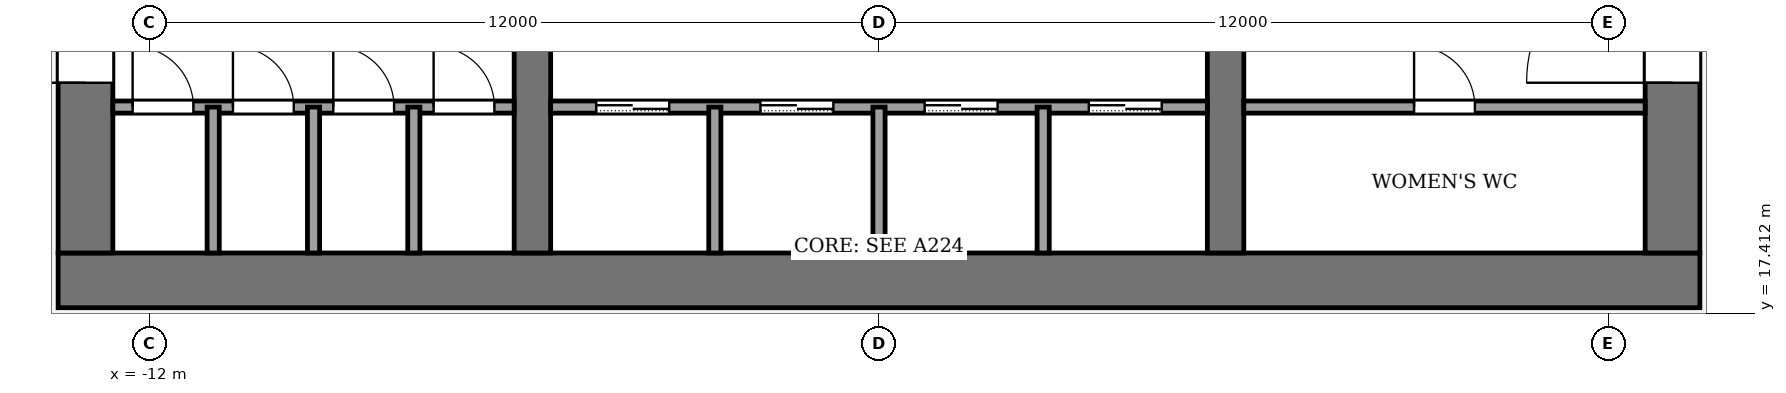
"""IFC4 building model, lengths in metres.
Left out: names, types, materials, properties, quantities, classifications, styles, units other than length and angle.
Written with IfcOpenShell. Run it as: python <this file> out.ifc"""

import sys

from ifc_helpers import new_model, si_unit, direction, frame, frame_2d, origin, place, context, subcontext, project, spatial, rectangle, extrude, element, fill, save


model = new_model("IFC4")
c1 = context("Model", 3, precision=1e-05, world=origin(), true_north=direction((0.0, 1.0)))
c2 = subcontext(c1, "Body", "Model", "MODEL_VIEW")
j1 = project(units=[si_unit("LENGTHUNIT", "METRE"), si_unit("PLANEANGLEUNIT", "RADIAN")], contexts=[c1])
p1 = place(None, origin())
s1 = spatial("IfcSite", under=j1, at=p1, CompositionType="ELEMENT")
p2 = place(p1, origin())
s2 = spatial("IfcBuilding", under=s1, at=p2, CompositionType="ELEMENT")
p3 = place(p2, frame((0.0, 0.0, 218.0)))
s3 = spatial("IfcBuildingStorey", under=s2, at=p3, CompositionType="ELEMENT", Elevation=218.0)
p4 = place(p3, frame((-13.5, 17.95, -0.13), z_axis=(0.0, 0.0, 1.0), x_axis=(1.0, 0.0, 0.0)))
e1 = element("IfcWall", 1, at=p4, inside=s3, PredefinedType="SHEAR", context=c2, shape_type="SweptSolid", body=[
    extrude(rectangle(XDim=27.0, YDim=0.9, at=frame_2d((13.5, 0.0))), origin(), (0.0, 0.0, 1.0), 4.0),
])
p5 = place(p3, frame((-13.05, 18.4, -0.13), z_axis=(0.0, 0.0, 1.0), x_axis=(0.0, 1.0, 0.0)))
e2 = element("IfcWall", 2, at=p5, inside=s3, PredefinedType="SHEAR", context=c2, shape_type="SweptSolid", body=[
    extrude(rectangle(XDim=19.2, YDim=0.9, at=frame_2d((9.6, 0.0))), origin(), (0.0, 0.0, 1.0), 4.0),
])
p6 = place(p5, frame((2.8, 0.0, 0.13)))
e3 = element("IfcOpeningElement", 3, at=p6, cuts=e2, PredefinedType="OPENING", context=c2, shape_type="SweptSolid", body=[
    extrude(rectangle(XDim=2.4, YDim=2.4, at=frame_2d((1.2, 1.2))), frame((0.0, 0.46, 0.0), z_axis=(0.0, -1.0, 0.0), x_axis=(1.0, 0.0, 0.0)), (0.0, 0.0, 1.0), 0.92),
])
p7 = place(p5, frame((13.4, 0.0, 0.13)))
e4 = element("IfcOpeningElement", 4, at=p7, cuts=e2, PredefinedType="OPENING", context=c2, shape_type="SweptSolid", body=[
    extrude(rectangle(XDim=1.4, YDim=2.2, at=frame_2d((0.7, 1.1))), frame((0.0, 0.46, 0.0), z_axis=(0.0, -1.0, 0.0), x_axis=(1.0, 0.0, 0.0)), (0.0, 0.0, 1.0), 0.92),
])
p8 = place(p3, frame((13.05, 18.4, -0.13), z_axis=(0.0, 0.0, 1.0), x_axis=(0.0, 1.0, 0.0)))
e5 = element("IfcWall", 5, at=p8, inside=s3, PredefinedType="SHEAR", context=c2, shape_type="SweptSolid", body=[
    extrude(rectangle(XDim=19.2, YDim=0.9, at=frame_2d((9.6, 0.0))), origin(), (0.0, 0.0, 1.0), 4.0),
])
p9 = place(p8, frame((2.8, 0.0, 0.13)))
e6 = element("IfcOpeningElement", 6, at=p9, cuts=e5, PredefinedType="OPENING", context=c2, shape_type="SweptSolid", body=[
    extrude(rectangle(XDim=2.4, YDim=2.4, at=frame_2d((1.2, 1.2))), frame((0.0, 0.46, 0.0), z_axis=(0.0, -1.0, 0.0), x_axis=(1.0, 0.0, 0.0)), (0.0, 0.0, 1.0), 0.92),
])
p10 = place(p8, frame((13.3, 0.0, 0.13)))
e7 = element("IfcOpeningElement", 7, at=p10, cuts=e5, PredefinedType="OPENING", context=c2, shape_type="SweptSolid", body=[
    extrude(rectangle(XDim=2.4, YDim=2.4, at=frame_2d((1.2, 1.2))), frame((0.0, 0.46, 0.0), z_axis=(0.0, -1.0, 0.0), x_axis=(1.0, 0.0, 0.0)), (0.0, 0.0, 1.0), 0.92),
])
p11 = place(p3, frame((-5.7, 18.4, -0.13), z_axis=(0.0, 0.0, 1.0), x_axis=(0.0, 1.0, 0.0)))
e8 = element("IfcWall", 8, at=p11, inside=s3, PredefinedType="SHEAR", context=c2, shape_type="SweptSolid", body=[
    extrude(rectangle(XDim=19.2, YDim=0.6, at=frame_2d((9.6, 0.0))), origin(), (0.0, 0.0, 1.0), 4.0),
])
p12 = place(p11, frame((8.35, 0.0, 0.13)))
e9 = element("IfcOpeningElement", 9, at=p12, cuts=e8, PredefinedType="OPENING", context=c2, shape_type="SweptSolid", body=[
    extrude(rectangle(XDim=0.9, YDim=2.1, at=frame_2d((0.45, 1.05))), frame((0.0, 0.31, 0.0), z_axis=(0.0, -1.0, 0.0), x_axis=(1.0, 0.0, 0.0)), (0.0, 0.0, 1.0), 0.62),
])
p13 = place(p3, frame((5.7, 18.4, -0.13), z_axis=(0.0, 0.0, 1.0), x_axis=(0.0, 1.0, 0.0)))
e10 = element("IfcWall", 10, at=p13, inside=s3, PredefinedType="SHEAR", context=c2, shape_type="SweptSolid", body=[
    extrude(rectangle(XDim=19.2, YDim=0.6, at=frame_2d((9.6, 0.0))), origin(), (0.0, 0.0, 1.0), 4.0),
])
p14 = place(p13, frame((8.35, 0.0, 0.13)))
e11 = element("IfcOpeningElement", 11, at=p14, cuts=e10, PredefinedType="OPENING", context=c2, shape_type="SweptSolid", body=[
    extrude(rectangle(XDim=0.9, YDim=2.1, at=frame_2d((0.45, 1.05))), frame((0.0, 0.31, 0.0), z_axis=(0.0, -1.0, 0.0), x_axis=(1.0, 0.0, 0.0)), (0.0, 0.0, 1.0), 0.62),
])
p15 = place(p13, frame((13.3, 0.0, 0.13)))
e12 = element("IfcOpeningElement", 12, at=p15, cuts=e10, PredefinedType="OPENING", context=c2, shape_type="SweptSolid", body=[
    extrude(rectangle(XDim=2.4, YDim=2.4, at=frame_2d((1.2, 1.2))), frame((0.0, 0.31, 0.0), z_axis=(0.0, -1.0, 0.0), x_axis=(1.0, 0.0, 0.0)), (0.0, 0.0, 1.0), 0.62),
])
p16 = place(p3, frame((-12.6, 20.8, 0.0), z_axis=(0.0, 0.0, 1.0), x_axis=(1.0, 0.0, 0.0)))
e13 = element("IfcWall", 13, at=p16, inside=s3, PredefinedType="PARTITIONING", context=c2, shape_type="SweptSolid", body=[
    extrude(rectangle(XDim=6.6, YDim=0.2, at=frame_2d((3.3, 0.0))), origin(), (0.0, 0.0, 1.0), 3.87),
])
p17 = place(p16, frame((0.325, 0.0, 0.0)))
e14 = element("IfcOpeningElement", 14, at=p17, cuts=e13, PredefinedType="OPENING", context=c2, shape_type="SweptSolid", body=[
    extrude(rectangle(XDim=1.0, YDim=2.1, at=frame_2d((0.5, 1.05))), frame((0.0, 0.11, 0.0), z_axis=(0.0, -1.0, 0.0), x_axis=(1.0, 0.0, 0.0)), (0.0, 0.0, 1.0), 0.22),
])
p18 = place(p16, frame((1.975, 0.0, 0.0)))
e15 = element("IfcOpeningElement", 15, at=p18, cuts=e13, PredefinedType="OPENING", context=c2, shape_type="SweptSolid", body=[
    extrude(rectangle(XDim=1.0, YDim=2.1, at=frame_2d((0.5, 1.05))), frame((0.0, 0.11, 0.0), z_axis=(0.0, -1.0, 0.0), x_axis=(1.0, 0.0, 0.0)), (0.0, 0.0, 1.0), 0.22),
])
p19 = place(p16, frame((3.625, 0.0, 0.0)))
e16 = element("IfcOpeningElement", 16, at=p19, cuts=e13, PredefinedType="OPENING", context=c2, shape_type="SweptSolid", body=[
    extrude(rectangle(XDim=1.0, YDim=2.1, at=frame_2d((0.5, 1.05))), frame((0.0, 0.11, 0.0), z_axis=(0.0, -1.0, 0.0), x_axis=(1.0, 0.0, 0.0)), (0.0, 0.0, 1.0), 0.22),
])
p20 = place(p16, frame((5.275, 0.0, 0.0)))
e17 = element("IfcOpeningElement", 17, at=p20, cuts=e13, PredefinedType="OPENING", context=c2, shape_type="SweptSolid", body=[
    extrude(rectangle(XDim=1.0, YDim=2.1, at=frame_2d((0.5, 1.05))), frame((0.0, 0.11, 0.0), z_axis=(0.0, -1.0, 0.0), x_axis=(1.0, 0.0, 0.0)), (0.0, 0.0, 1.0), 0.22),
])
p21 = place(p3, frame((-5.4, 20.8, 0.0), z_axis=(0.0, 0.0, 1.0), x_axis=(1.0, 0.0, 0.0)))
e18 = element("IfcWall", 18, at=p21, inside=s3, PredefinedType="PARTITIONING", context=c2, shape_type="SweptSolid", body=[
    extrude(rectangle(XDim=10.8, YDim=0.2, at=frame_2d((5.4, 0.0))), origin(), (0.0, 0.0, 1.0), 3.87),
])
p22 = place(p21, frame((0.75, 0.0, 0.0)))
e19 = element("IfcOpeningElement", 19, at=p22, cuts=e18, PredefinedType="OPENING", context=c2, shape_type="SweptSolid", body=[
    extrude(rectangle(XDim=1.2, YDim=2.2, at=frame_2d((0.6, 1.1))), frame((0.0, 0.11, 0.0), z_axis=(0.0, -1.0, 0.0), x_axis=(1.0, 0.0, 0.0)), (0.0, 0.0, 1.0), 0.22),
])
p23 = place(p21, frame((3.45, 0.0, 0.0)))
e20 = element("IfcOpeningElement", 20, at=p23, cuts=e18, PredefinedType="OPENING", context=c2, shape_type="SweptSolid", body=[
    extrude(rectangle(XDim=1.2, YDim=2.2, at=frame_2d((0.6, 1.1))), frame((0.0, 0.11, 0.0), z_axis=(0.0, -1.0, 0.0), x_axis=(1.0, 0.0, 0.0)), (0.0, 0.0, 1.0), 0.22),
])
p24 = place(p21, frame((6.15, 0.0, 0.0)))
e21 = element("IfcOpeningElement", 21, at=p24, cuts=e18, PredefinedType="OPENING", context=c2, shape_type="SweptSolid", body=[
    extrude(rectangle(XDim=1.2, YDim=2.2, at=frame_2d((0.6, 1.1))), frame((0.0, 0.11, 0.0), z_axis=(0.0, -1.0, 0.0), x_axis=(1.0, 0.0, 0.0)), (0.0, 0.0, 1.0), 0.22),
])
p25 = place(p21, frame((8.85, 0.0, 0.0)))
e22 = element("IfcOpeningElement", 22, at=p25, cuts=e18, PredefinedType="OPENING", context=c2, shape_type="SweptSolid", body=[
    extrude(rectangle(XDim=1.2, YDim=2.2, at=frame_2d((0.6, 1.1))), frame((0.0, 0.11, 0.0), z_axis=(0.0, -1.0, 0.0), x_axis=(1.0, 0.0, 0.0)), (0.0, 0.0, 1.0), 0.22),
])
p26 = place(p3, frame((6.0, 20.8, 0.0), z_axis=(0.0, 0.0, 1.0), x_axis=(1.0, 0.0, 0.0)))
e23 = element("IfcWall", 23, at=p26, inside=s3, PredefinedType="PARTITIONING", context=c2, shape_type="SweptSolid", body=[
    extrude(rectangle(XDim=6.6, YDim=0.2, at=frame_2d((3.3, 0.0))), origin(), (0.0, 0.0, 1.0), 3.87),
])
p27 = place(p26, frame((2.8, 0.0, 0.0)))
e24 = element("IfcOpeningElement", 24, at=p27, cuts=e23, PredefinedType="OPENING", context=c2, shape_type="SweptSolid", body=[
    extrude(rectangle(XDim=1.0, YDim=2.1, at=frame_2d((0.5, 1.05))), frame((0.0, 0.11, 0.0), z_axis=(0.0, -1.0, 0.0), x_axis=(1.0, 0.0, 0.0)), (0.0, 0.0, 1.0), 0.22),
])
for number, where, z_axis, x_axis in (
    (25, (-10.95, 18.4, 0.0), (0.0, 0.0, 1.0), (0.0, 1.0, 0.0)),
    (26, (-9.3, 18.4, 0.0), (0.0, 0.0, 1.0), (0.0, 1.0, 0.0)),
    (27, (-7.65, 18.4, 0.0), (0.0, 0.0, 1.0), (0.0, 1.0, 0.0)),
    (28, (-2.7, 18.4, 0.0), (0.0, 0.0, 1.0), (0.0, 1.0, 0.0)),
    (29, (0.0, 18.4, 0.0), (0.0, 0.0, 1.0), (0.0, 1.0, 0.0)),
    (30, (2.7, 18.4, 0.0), (0.0, 0.0, 1.0), (0.0, 1.0, 0.0)),
):
    element("IfcWall", number, at=place(p3, frame(where, z_axis=z_axis, x_axis=x_axis)), inside=s3, PredefinedType="PARTITIONING", context=c2, shape_type="SweptSolid", body=[
        extrude(rectangle(XDim=2.4, YDim=0.2, at=frame_2d((1.2, 0.0))), origin(), (0.0, 0.0, 1.0), 3.87),
    ])
p28 = place(p22, origin())
e31 = element("IfcDoor", 31, at=p28, inside=s3, OperationType="SLIDING_TO_LEFT", PredefinedType="DOOR", context=c2, shape_type="SweptSolid", body=[
    extrude(rectangle(XDim=1.2, YDim=2.2, at=frame_2d((0.6, 1.1))), frame((0.0, 0.025, 0.0), z_axis=(0.0, -1.0, 0.0), x_axis=(1.0, 0.0, 0.0)), (0.0, 0.0, 1.0), 0.05),
])
fill(e19, e31)
p29 = place(p23, origin())
e32 = element("IfcDoor", 32, at=p29, inside=s3, OperationType="SLIDING_TO_LEFT", PredefinedType="DOOR", context=c2, shape_type="SweptSolid", body=[
    extrude(rectangle(XDim=1.2, YDim=2.2, at=frame_2d((0.6, 1.1))), frame((0.0, 0.025, 0.0), z_axis=(0.0, -1.0, 0.0), x_axis=(1.0, 0.0, 0.0)), (0.0, 0.0, 1.0), 0.05),
])
fill(e20, e32)
p30 = place(p24, origin())
e33 = element("IfcDoor", 33, at=p30, inside=s3, OperationType="SLIDING_TO_LEFT", PredefinedType="DOOR", context=c2, shape_type="SweptSolid", body=[
    extrude(rectangle(XDim=1.2, YDim=2.2, at=frame_2d((0.6, 1.1))), frame((0.0, 0.025, 0.0), z_axis=(0.0, -1.0, 0.0), x_axis=(1.0, 0.0, 0.0)), (0.0, 0.0, 1.0), 0.05),
])
fill(e21, e33)
p31 = place(p25, origin())
e34 = element("IfcDoor", 34, at=p31, inside=s3, OperationType="SLIDING_TO_LEFT", PredefinedType="DOOR", context=c2, shape_type="SweptSolid", body=[
    extrude(rectangle(XDim=1.2, YDim=2.2, at=frame_2d((0.6, 1.1))), frame((0.0, 0.025, 0.0), z_axis=(0.0, -1.0, 0.0), x_axis=(1.0, 0.0, 0.0)), (0.0, 0.0, 1.0), 0.05),
])
fill(e22, e34)
p32 = place(p17, origin())
e35 = element("IfcDoor", 35, at=p32, inside=s3, OperationType="SINGLE_SWING_RIGHT", PredefinedType="DOOR", context=c2, shape_type="SweptSolid", body=[
    extrude(rectangle(XDim=1.0, YDim=2.1, at=frame_2d((0.5, 1.05))), frame((0.0, 0.025, 0.0), z_axis=(0.0, -1.0, 0.0), x_axis=(1.0, 0.0, 0.0)), (0.0, 0.0, 1.0), 0.05),
])
fill(e14, e35)
p33 = place(p18, origin())
e36 = element("IfcDoor", 36, at=p33, inside=s3, OperationType="SINGLE_SWING_RIGHT", PredefinedType="DOOR", context=c2, shape_type="SweptSolid", body=[
    extrude(rectangle(XDim=1.0, YDim=2.1, at=frame_2d((0.5, 1.05))), frame((0.0, 0.025, 0.0), z_axis=(0.0, -1.0, 0.0), x_axis=(1.0, 0.0, 0.0)), (0.0, 0.0, 1.0), 0.05),
])
fill(e15, e36)
p34 = place(p19, origin())
e37 = element("IfcDoor", 37, at=p34, inside=s3, OperationType="SINGLE_SWING_LEFT", PredefinedType="DOOR", context=c2, shape_type="SweptSolid", body=[
    extrude(rectangle(XDim=1.0, YDim=2.1, at=frame_2d((0.5, 1.05))), frame((0.0, 0.025, 0.0), z_axis=(0.0, -1.0, 0.0), x_axis=(1.0, 0.0, 0.0)), (0.0, 0.0, 1.0), 0.05),
])
fill(e16, e37)
p35 = place(p20, origin())
e38 = element("IfcDoor", 38, at=p35, inside=s3, OperationType="SINGLE_SWING_LEFT", PredefinedType="DOOR", context=c2, shape_type="SweptSolid", body=[
    extrude(rectangle(XDim=1.0, YDim=2.1, at=frame_2d((0.5, 1.05))), frame((0.0, 0.025, 0.0), z_axis=(0.0, -1.0, 0.0), x_axis=(1.0, 0.0, 0.0)), (0.0, 0.0, 1.0), 0.05),
])
fill(e17, e38)
p36 = place(p27, origin())
e39 = element("IfcDoor", 39, at=p36, inside=s3, OperationType="SINGLE_SWING_LEFT", PredefinedType="DOOR", context=c2, shape_type="SweptSolid", body=[
    extrude(rectangle(XDim=1.0, YDim=2.1, at=frame_2d((0.5, 1.05))), frame((0.0, 0.025, 0.0), z_axis=(0.0, -1.0, 0.0), x_axis=(1.0, 0.0, 0.0)), (0.0, 0.0, 1.0), 0.05),
])
fill(e24, e39)
p37 = place(p6, origin())
e40 = element("IfcDoor", 40, at=p37, inside=s3, OperationType="DOUBLE_DOOR_SINGLE_SWING", PredefinedType="DOOR", context=c2, shape_type="SweptSolid", body=[
    extrude(rectangle(XDim=2.4, YDim=2.4, at=frame_2d((1.2, 1.2))), frame((0.0, 0.025, 0.0), z_axis=(0.0, -1.0, 0.0), x_axis=(1.0, 0.0, 0.0)), (0.0, 0.0, 1.0), 0.05),
])
fill(e3, e40)
p38 = place(p9, origin())
e41 = element("IfcDoor", 41, at=p38, inside=s3, OperationType="DOUBLE_DOOR_SINGLE_SWING", PredefinedType="DOOR", context=c2, shape_type="SweptSolid", body=[
    extrude(rectangle(XDim=2.4, YDim=2.4, at=frame_2d((1.2, 1.2))), frame((0.0, 0.025, 0.0), z_axis=(0.0, -1.0, 0.0), x_axis=(1.0, 0.0, 0.0)), (0.0, 0.0, 1.0), 0.05),
])
fill(e6, e41)
save(model, sys.argv[1])
